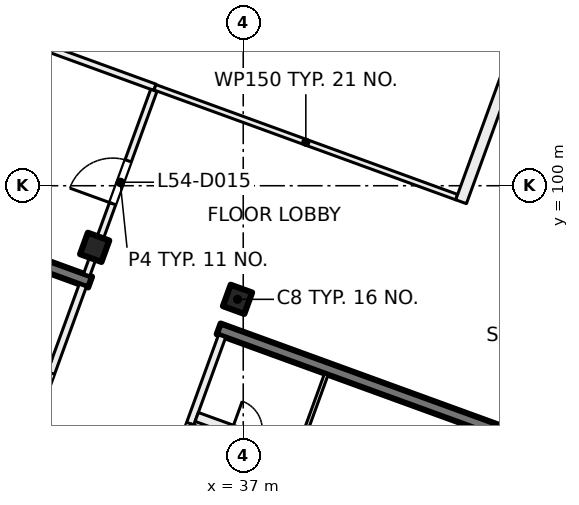
"""IFC4 building model, lengths in metres.
Left out: names, types, materials, properties, quantities, classifications, styles, units other than length and angle.
Written with IfcOpenShell. Run it as: python <this file> out.ifc"""

import sys

from ifc_helpers import new_model, si_unit, direction, frame, frame_2d, origin, origin_2d, place, context, subcontext, project, spatial, rectangle, extrude, element, fill, save


model = new_model("IFC4")
c1 = context("Model", 3, precision=1e-05, world=origin(), true_north=direction((0.0, 1.0)))
c2 = subcontext(c1, "Body", "Model", "MODEL_VIEW")
j1 = project(units=[si_unit("LENGTHUNIT", "METRE"), si_unit("PLANEANGLEUNIT", "RADIAN")], contexts=[c1])
p1 = place(None, origin())
s1 = spatial("IfcSite", under=j1, at=p1, CompositionType="ELEMENT")
p2 = place(p1, origin())
s2 = spatial("IfcBuilding", under=s1, at=p2, CompositionType="ELEMENT")
p3 = place(p2, frame((0.0, 0.0, 228.0)))
s3 = spatial("IfcBuildingStorey", under=s2, at=p3, CompositionType="ELEMENT", Elevation=228.0)
for number, where, z_axis, x_axis in (
    (1, (36.849, 97.011, 0.0), (0.0, 0.0, 1.0), (-0.342, -0.94, 0.0)),
    (2, (33.091, 98.379, 0.0), (0.0, 0.0, 1.0), (-0.342, -0.94, 0.0)),
):
    element("IfcColumn", number, at=place(p3, frame(where, z_axis=z_axis, x_axis=x_axis)), inside=s3, PredefinedType="COLUMN", context=c2, shape_type="SweptSolid", body=[
        extrude(rectangle(XDim=0.6, YDim=0.6, at=origin_2d()), origin(), (0.0, 0.0, 1.0), 4.0),
    ])
p4 = place(p3, frame((41.874, 85.232, 0.0), z_axis=(0.0, 0.0, 1.0), x_axis=(0.342020437038, 0.939692513883, 0.0)))
e3 = element("IfcWall", 3, at=p4, inside=s3, PredefinedType="SHEAR", context=c2, shape_type="SweptSolid", body=[
    extrude(rectangle(XDim=8.975, YDim=0.5, at=frame_2d((4.487, 0.0))), origin(), (0.0, 0.0, 1.0), 4.0),
])
p5 = place(p3, frame((44.529, 93.258, 0.0), z_axis=(0.0, 0.0, 1.0), x_axis=(-0.9396917844, 0.342022441267, 0.0)))
e4 = element("IfcWall", 4, at=p5, inside=s3, PredefinedType="SHEAR", context=c2, shape_type="SweptSolid", body=[
    extrude(rectangle(XDim=8.7, YDim=0.3, at=frame_2d((4.35, 0.0))), origin(), (0.0, 0.0, 1.0), 4.0),
])
p6 = place(p3, frame((32.971, 97.465, 0.0), z_axis=(0.0, 0.0, 1.0), x_axis=(-0.939695066972, 0.34201342241, 0.0)))
e5 = element("IfcWall", 5, at=p6, inside=s3, PredefinedType="SHEAR", context=c2, shape_type="SweptSolid", body=[
    extrude(rectangle(XDim=8.7, YDim=0.3, at=frame_2d((4.35, 0.0))), origin(), (0.0, 0.0, 1.0), 4.0),
])
p7 = place(p3, frame((24.666, 100.669, 0.0), z_axis=(0.0, 0.0, 1.0), x_axis=(0.34201964167, 0.939692803373, 0.0)))
e6 = element("IfcWall", 6, at=p7, inside=s3, PredefinedType="SOLIDWALL", context=c2, shape_type="SweptSolid", body=[
    extrude(rectangle(XDim=32.884, YDim=0.6, at=frame_2d((16.442, 0.0))), origin(), (0.0, 0.0, 1.0), 3.625),
])
p8 = place(p7, frame((1.48, 0.0, 0.9)))
e7 = element("IfcOpeningElement", 7, at=p8, cuts=e6, PredefinedType="OPENING", context=c2, shape_type="SweptSolid", body=[
    extrude(rectangle(XDim=3.0, YDim=2.4, at=frame_2d((1.5, 1.2))), frame((0.0, 0.31, 0.0), z_axis=(0.0, -1.0, 0.0), x_axis=(1.0, 0.0, 0.0)), (0.0, 0.0, 1.0), 0.62),
])
p9 = place(p7, frame((5.98, 0.0, 0.9)))
e8 = element("IfcOpeningElement", 8, at=p9, cuts=e6, PredefinedType="OPENING", context=c2, shape_type="SweptSolid", body=[
    extrude(rectangle(XDim=3.0, YDim=2.4, at=frame_2d((1.5, 1.2))), frame((0.0, 0.31, 0.0), z_axis=(0.0, -1.0, 0.0), x_axis=(1.0, 0.0, 0.0)), (0.0, 0.0, 1.0), 0.62),
])
p10 = place(p7, frame((10.48, 0.0, 0.9)))
e9 = element("IfcOpeningElement", 9, at=p10, cuts=e6, PredefinedType="OPENING", context=c2, shape_type="SweptSolid", body=[
    extrude(rectangle(XDim=3.0, YDim=2.4, at=frame_2d((1.5, 1.2))), frame((0.0, 0.31, 0.0), z_axis=(0.0, -1.0, 0.0), x_axis=(1.0, 0.0, 0.0)), (0.0, 0.0, 1.0), 0.62),
])
p11 = place(p7, frame((14.98, 0.0, 0.9)))
e10 = element("IfcOpeningElement", 10, at=p11, cuts=e6, PredefinedType="OPENING", context=c2, shape_type="SweptSolid", body=[
    extrude(rectangle(XDim=3.0, YDim=2.4, at=frame_2d((1.5, 1.2))), frame((0.0, 0.31, 0.0), z_axis=(0.0, -1.0, 0.0), x_axis=(1.0, 0.0, 0.0)), (0.0, 0.0, 1.0), 0.62),
])
p12 = place(p7, frame((20.08, 0.0, 0.0)))
e11 = element("IfcOpeningElement", 11, at=p12, cuts=e6, PredefinedType="OPENING", context=c2, shape_type="SweptSolid", body=[
    extrude(rectangle(XDim=1.8, YDim=2.4, at=frame_2d((0.9, 1.2))), frame((0.0, 0.31, 0.0), z_axis=(0.0, -1.0, 0.0), x_axis=(1.0, 0.0, 0.0)), (0.0, 0.0, 1.0), 0.62),
])
p13 = place(p7, frame((23.98, 0.0, 0.9)))
e12 = element("IfcOpeningElement", 12, at=p13, cuts=e6, PredefinedType="OPENING", context=c2, shape_type="SweptSolid", body=[
    extrude(rectangle(XDim=3.0, YDim=2.4, at=frame_2d((1.5, 1.2))), frame((0.0, 0.31, 0.0), z_axis=(0.0, -1.0, 0.0), x_axis=(1.0, 0.0, 0.0)), (0.0, 0.0, 1.0), 0.62),
])
p14 = place(p7, frame((28.48, 0.0, 0.9)))
e13 = element("IfcOpeningElement", 13, at=p14, cuts=e6, PredefinedType="OPENING", context=c2, shape_type="SweptSolid", body=[
    extrude(rectangle(XDim=3.0, YDim=2.4, at=frame_2d((1.5, 1.2))), frame((0.0, 0.31, 0.0), z_axis=(0.0, -1.0, 0.0), x_axis=(1.0, 0.0, 0.0)), (0.0, 0.0, 1.0), 0.62),
])
p15 = place(p3, frame((31.427, 93.663, 0.0), z_axis=(0.0, 0.0, 1.0), x_axis=(0.342030870568, 0.93968871632, 0.0)))
e14 = element("IfcWall", 14, at=p15, inside=s3, PredefinedType="PARTITIONING", context=c2, shape_type="SweptSolid", body=[
    extrude(rectangle(XDim=3.95, YDim=0.2, at=frame_2d((1.975, 0.0))), origin(), (0.0, 0.0, 1.0), 3.625),
])
p16 = place(p15, frame((0.3, 0.0, 0.0)))
e15 = element("IfcOpeningElement", 15, at=p16, cuts=e14, PredefinedType="OPENING", context=c2, shape_type="SweptSolid", body=[
    extrude(rectangle(XDim=1.2, YDim=2.1, at=frame_2d((0.6, 1.05))), frame((0.0, 0.11, 0.0), z_axis=(0.0, -1.0, 0.0), x_axis=(1.0, 0.0, 0.0)), (0.0, 0.0, 1.0), 0.22),
])
p17 = place(p3, frame((23.983, 98.208, 0.0), z_axis=(0.0, 0.0, 1.0), x_axis=(0.939699751196, -0.342000552051, 0.0)))
e16 = element("IfcWall", 16, at=p17, inside=s3, PredefinedType="PARTITIONING", context=c2, shape_type="SweptSolid", body=[
    extrude(rectangle(XDim=8.45, YDim=0.25, at=frame_2d((4.225, 0.0))), origin(), (0.0, 0.0, 1.0), 3.625),
])
p18 = place(p17, frame((5.16, 0.0, 0.0)))
e17 = element("IfcOpeningElement", 17, at=p18, cuts=e16, PredefinedType="OPENING", context=c2, shape_type="SweptSolid", body=[
    extrude(rectangle(XDim=1.0, YDim=2.1, at=frame_2d((0.5, 1.05))), frame((0.0, 0.135, 0.0), z_axis=(0.0, -1.0, 0.0), x_axis=(1.0, 0.0, 0.0)), (0.0, 0.0, 1.0), 0.27),
])
p19 = place(p17, frame((0.885, 0.0, 0.0)))
e18 = element("IfcOpeningElement", 18, at=p19, cuts=e16, PredefinedType="OPENING", context=c2, shape_type="SweptSolid", body=[
    extrude(rectangle(XDim=1.0, YDim=2.1, at=frame_2d((0.5, 1.05))), frame((0.0, 0.135, 0.0), z_axis=(0.0, -1.0, 0.0), x_axis=(1.0, 0.0, 0.0)), (0.0, 0.0, 1.0), 0.27),
])
p20 = place(p3, frame((36.443, 96.041, 0.0), z_axis=(0.0, 0.0, 1.0), x_axis=(-0.341996156931, -0.939701350773, 0.0)))
e19 = element("IfcWall", 19, at=p20, inside=s3, PredefinedType="PARTITIONING", context=c2, shape_type="SweptSolid", body=[
    extrude(rectangle(XDim=3.95, YDim=0.2, at=frame_2d((1.975, 0.0))), origin(), (0.0, 0.0, 1.0), 3.625),
])
p21 = place(p20, frame((2.45, 0.0, 0.0)))
e20 = element("IfcOpeningElement", 20, at=p21, cuts=e19, PredefinedType="OPENING", context=c2, shape_type="SweptSolid", body=[
    extrude(rectangle(XDim=1.2, YDim=2.1, at=frame_2d((0.6, 1.05))), frame((0.0, 0.11, 0.0), z_axis=(0.0, -1.0, 0.0), x_axis=(1.0, 0.0, 0.0)), (0.0, 0.0, 1.0), 0.22),
])
p22 = place(p3, frame((35.776, 93.916, 0.0), z_axis=(0.0, 0.0, 1.0), x_axis=(0.939690465531, -0.342026064782, 0.0)))
e21 = element("IfcWall", 21, at=p22, inside=s3, PredefinedType="PARTITIONING", context=c2, shape_type="SweptSolid", body=[
    extrude(rectangle(XDim=8.45, YDim=0.25, at=frame_2d((4.225, 0.0))), origin(), (0.0, 0.0, 1.0), 3.625),
])
p23 = place(p22, frame((0.985, 0.0, 0.0)))
e22 = element("IfcOpeningElement", 22, at=p23, cuts=e21, PredefinedType="OPENING", context=c2, shape_type="SweptSolid", body=[
    extrude(rectangle(XDim=0.8, YDim=2.1, at=frame_2d((0.4, 1.05))), frame((0.0, 0.135, 0.0), z_axis=(0.0, -1.0, 0.0), x_axis=(1.0, 0.0, 0.0)), (0.0, 0.0, 1.0), 0.27),
])
p24 = place(p22, frame((5.26, 0.0, 0.0)))
e23 = element("IfcOpeningElement", 23, at=p24, cuts=e21, PredefinedType="OPENING", context=c2, shape_type="SweptSolid", body=[
    extrude(rectangle(XDim=0.8, YDim=2.1, at=frame_2d((0.4, 1.05))), frame((0.0, 0.135, 0.0), z_axis=(0.0, -1.0, 0.0), x_axis=(1.0, 0.0, 0.0)), (0.0, 0.0, 1.0), 0.27),
])
p25 = place(p3, frame((39.187, 95.042, 0.0), z_axis=(0.0, 0.0, 1.0), x_axis=(-0.342023078919, -0.939691552312, 0.0)))
e24 = element("IfcWall", 24, at=p25, inside=s3, PredefinedType="PARTITIONING", context=c2, shape_type="SweptSolid", body=[
    extrude(rectangle(XDim=2.1, YDim=0.1, at=frame_2d((1.05, 0.0))), origin(), (0.0, 0.0, 1.0), 3.625),
])
p26 = place(p3, frame((26.736, 105.48, 0.0), z_axis=(0.0, 0.0, 1.0), x_axis=(0.939706509432, -0.341981982173, 0.0)))
e25 = element("IfcWall", 25, at=p26, inside=s3, PredefinedType="PARTITIONING", context=c2, shape_type="SweptSolid", body=[
    extrude(rectangle(XDim=8.45, YDim=0.175, at=frame_2d((4.225, 0.0))), origin(), (0.0, 0.0, 1.0), 3.625),
])
p27 = place(p3, frame((32.881, 97.657, 0.0), z_axis=(0.0, 0.0, 1.0), x_axis=(0.342058204353, 0.939678766832, 0.0)))
e26 = element("IfcWall", 26, at=p27, inside=s3, PredefinedType="PARTITIONING", context=c2, shape_type="SweptSolid", body=[
    extrude(rectangle(XDim=5.163, YDim=0.175, at=frame_2d((2.581, 0.0))), origin(), (0.0, 0.0, 1.0), 3.625),
])
p28 = place(p27, frame((1.991, 0.0, 0.0)))
e27 = element("IfcOpeningElement", 27, at=p28, cuts=e26, PredefinedType="OPENING", context=c2, shape_type="SweptSolid", body=[
    extrude(rectangle(XDim=1.2, YDim=2.1, at=frame_2d((0.6, 1.05))), frame((0.0, 0.097, 0.0), z_axis=(0.0, -1.0, 0.0), x_axis=(1.0, 0.0, 0.0)), (0.0, 0.0, 1.0), 0.195),
])
p29 = place(p3, frame((34.677, 102.59, 0.0), z_axis=(0.0, 0.0, 1.0), x_axis=(0.939683705252, -0.342044637561, 0.0)))
e28 = element("IfcWall", 28, at=p29, inside=s3, PredefinedType="PARTITIONING", context=c2, shape_type="SweptSolid", body=[
    extrude(rectangle(XDim=8.45, YDim=0.15, at=frame_2d((4.225, 0.0))), origin(), (0.0, 0.0, 1.0), 3.625),
])
p30 = place(p3, frame((42.732, 99.579, 0.0), z_axis=(0.0, 0.0, 1.0), x_axis=(0.342053589012, 0.939680446877, 0.0)))
e29 = element("IfcWall", 29, at=p30, inside=s3, PredefinedType="PARTITIONING", context=c2, shape_type="SweptSolid", body=[
    extrude(rectangle(XDim=23.166, YDim=0.3, at=frame_2d((11.583, 0.0))), origin(), (0.0, 0.0, 1.0), 3.625),
])
p31 = place(p30, frame((15.225, 0.0, 0.0)))
e30 = element("IfcOpeningElement", 30, at=p31, cuts=e29, PredefinedType="OPENING", context=c2, shape_type="SweptSolid", body=[
    extrude(rectangle(XDim=1.2, YDim=2.1, at=frame_2d((0.6, 1.05))), frame((0.0, 0.16, 0.0), z_axis=(0.0, -1.0, 0.0), x_axis=(1.0, 0.0, 0.0)), (0.0, 0.0, 1.0), 0.32),
])
p32 = place(p30, frame((19.725, 0.0, 0.0)))
e31 = element("IfcOpeningElement", 31, at=p32, cuts=e29, PredefinedType="OPENING", context=c2, shape_type="SweptSolid", body=[
    extrude(rectangle(XDim=1.2, YDim=2.1, at=frame_2d((0.6, 1.05))), frame((0.0, 0.16, 0.0), z_axis=(0.0, -1.0, 0.0), x_axis=(1.0, 0.0, 0.0)), (0.0, 0.0, 1.0), 0.32),
])
p33 = place(p30, frame((5.925, 0.0, 0.0)))
e32 = element("IfcOpeningElement", 32, at=p33, cuts=e29, PredefinedType="OPENING", context=c2, shape_type="SweptSolid", body=[
    extrude(rectangle(XDim=1.8, YDim=2.1, at=frame_2d((0.9, 1.05))), frame((0.0, 0.16, 0.0), z_axis=(0.0, -1.0, 0.0), x_axis=(1.0, 0.0, 0.0)), (0.0, 0.0, 1.0), 0.32),
])
p34 = place(p16, origin())
e33 = element("IfcDoor", 33, at=p34, inside=s3, OperationType="DOUBLE_DOOR_SINGLE_SWING", PredefinedType="DOOR", context=c2, shape_type="SweptSolid", body=[
    extrude(rectangle(XDim=1.2, YDim=2.1, at=frame_2d((0.6, 1.05))), frame((0.0, 0.025, 0.0), z_axis=(0.0, -1.0, 0.0), x_axis=(1.0, 0.0, 0.0)), (0.0, 0.0, 1.0), 0.05),
])
fill(e15, e33)
p35 = place(p21, origin())
e34 = element("IfcDoor", 34, at=p35, inside=s3, OperationType="DOUBLE_DOOR_SINGLE_SWING", PredefinedType="DOOR", context=c2, shape_type="SweptSolid", body=[
    extrude(rectangle(XDim=1.2, YDim=2.1, at=frame_2d((0.6, 1.05))), frame((0.0, 0.025, 0.0), z_axis=(0.0, -1.0, 0.0), x_axis=(1.0, 0.0, 0.0)), (0.0, 0.0, 1.0), 0.05),
])
fill(e20, e34)
p36 = place(p28, origin())
e35 = element("IfcDoor", 35, at=p36, inside=s3, OperationType="DOUBLE_DOOR_SINGLE_SWING", PredefinedType="DOOR", context=c2, shape_type="SweptSolid", body=[
    extrude(rectangle(XDim=1.2, YDim=2.1, at=frame_2d((0.6, 1.05))), frame((0.0, 0.025, 0.0), z_axis=(0.0, -1.0, 0.0), x_axis=(1.0, 0.0, 0.0)), (0.0, 0.0, 1.0), 0.05),
])
fill(e27, e35)
save(model, sys.argv[1])
